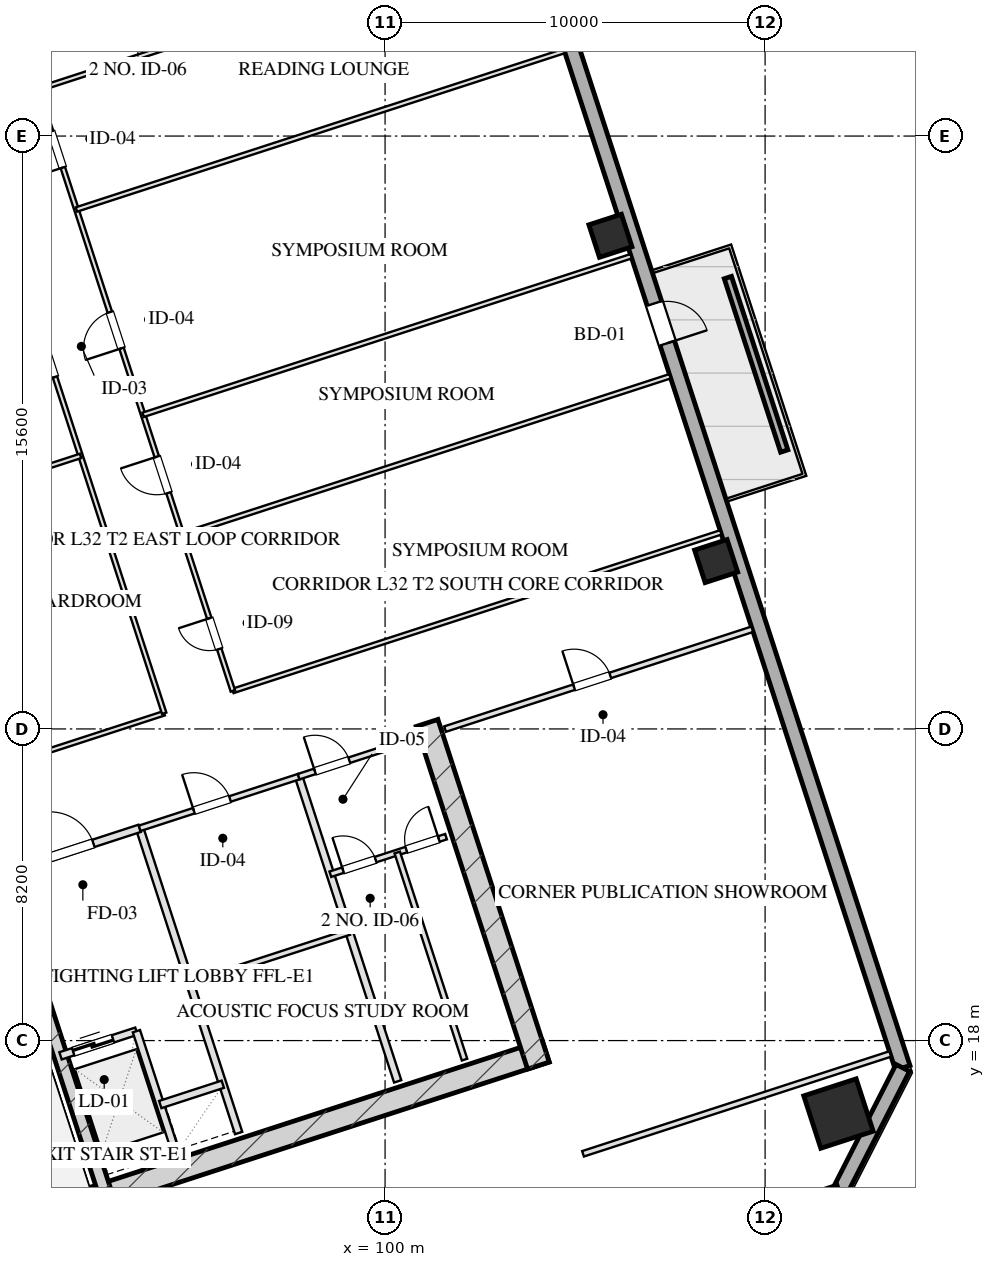
"""IFC4 building model, lengths in metres.
Left out: names, types, materials, properties, quantities, classifications, styles, units other than length and angle.
Written with IfcOpenShell. Run it as: python <this file> out.ifc"""

import sys

from ifc_helpers import new_model, si_unit, direction, frame, frame_2d, origin, origin_2d, place, context, subcontext, project, spatial, rectangle, hollow_rectangle, extrude, element, fill, save


model = new_model("IFC4")
c1 = context("Model", 3, precision=1e-05, world=origin(), true_north=direction((0.0, 1.0)))
c2 = subcontext(c1, "Body", "Model", "MODEL_VIEW")
j1 = project(units=[si_unit("LENGTHUNIT", "METRE"), si_unit("PLANEANGLEUNIT", "RADIAN")], contexts=[c1])
p1 = place(None, origin())
s1 = spatial("IfcSite", under=j1, at=p1, CompositionType="ELEMENT")
p2 = place(p1, origin())
s2 = spatial("IfcBuilding", under=s1, at=p2, CompositionType="ELEMENT")
p3 = place(p2, frame((0.0, 0.0, 124.2)))
s3 = spatial("IfcBuildingStorey", under=s2, at=p3, CompositionType="ELEMENT", Elevation=124.2)
p4 = place(p3, frame((88.63, 12.652, 0.0), z_axis=(0.0, 0.0, 1.0), x_axis=(0.95105714907, 0.309015046886, 0.0)))
e1 = element("IfcWall", 1, at=p4, inside=s3, PredefinedType="SHEAR", context=c2, shape_type="SweptSolid", body=[
    extrude(rectangle(XDim=16.4, YDim=0.6, at=frame_2d((8.2, 0.0))), origin(), (0.0, 0.0, 1.0), 3.45),
])
p5 = place(p3, frame((101.105, 26.358, 0.0), z_axis=(0.0, 0.0, 1.0), x_axis=(0.309010370028, -0.95105866865, 0.0)))
e2 = element("IfcWall", 2, at=p5, inside=s3, PredefinedType="SHEAR", context=c2, shape_type="SweptSolid", body=[
    extrude(rectangle(XDim=9.48, YDim=0.6, at=frame_2d((4.74, 0.0))), origin(), (0.0, 0.0, 1.0), 3.45),
])
p6 = place(p3, frame((90.486, 20.594, 0.0), z_axis=(0.0, 0.0, 1.0), x_axis=(0.309020428229, -0.951055400562, 0.0)))
e3 = element("IfcWall", 3, at=p6, inside=s3, PredefinedType="SHEAR", context=c2, shape_type="SweptSolid", body=[
    extrude(rectangle(XDim=6.98, YDim=0.35, at=frame_2d((3.49, 0.0))), origin(), (0.0, 0.0, 1.0), 3.45),
])
p7 = place(p3, frame((111.931, 16.08, 0.0), z_axis=(0.0, 0.0, 1.0), x_axis=(0.951056516295, 0.309016994375, 0.0)))
e4 = element("IfcColumn", 4, at=p7, inside=s3, PredefinedType="COLUMN", context=c2, shape_type="SweptSolid", body=[
    extrude(hollow_rectangle(XDim=1.45, YDim=1.45, WallThickness=0.05, at=origin_2d()), origin(), (0.0, 0.0, 1.0), 3.451),
])
for number, where, z_axis, x_axis in (
    (5, (108.711, 30.616, 0.0), (0.0, 0.0, 1.0), (0.951, 0.309, 0.0)),
    (6, (105.93, 39.176, 0.0), (0.0, 0.0, 1.0), (0.951, 0.309, 0.0)),
):
    element("IfcColumn", number, at=place(p3, frame(where, z_axis=z_axis, x_axis=x_axis)), inside=s3, PredefinedType="COLUMN", context=c2, shape_type="SweptSolid", body=[
        extrude(hollow_rectangle(XDim=0.9, YDim=0.9, WallThickness=0.032, at=origin_2d()), origin(), (0.0, 0.0, 1.0), 3.451),
    ])
p8 = place(p3, frame((99.284, 61.41, 0.0), z_axis=(0.0, 0.0, 1.0), x_axis=(0.309017542002, -0.95105633836, 0.0)))
e7 = element("IfcWall", 7, at=p8, inside=s3, PredefinedType="SOLIDWALL", context=c2, shape_type="SweptSolid", body=[
    extrude(rectangle(XDim=46.4, YDim=0.4, at=frame_2d((23.2, 0.0))), origin(), (0.0, 0.0, 1.0), 2.61),
])
p9 = place(p8, frame((25.25, 0.0, 0.0)))
e8 = element("IfcOpeningElement", 8, at=p9, cuts=e7, PredefinedType="OPENING", context=c2, shape_type="SweptSolid", body=[
    extrude(rectangle(XDim=1.1, YDim=2.15, at=frame_2d((0.55, 1.075))), frame((0.0, 0.21, 0.0), z_axis=(0.0, -1.0, 0.0), x_axis=(1.0, 0.0, 0.0)), (0.0, 0.0, 1.0), 0.42),
])
p10 = place(p3, frame((113.623, 17.281, 0.0), z_axis=(0.0, 0.0, 1.0), x_axis=(-0.454026238093, -0.890988313685, 0.0)))
e9 = element("IfcWall", 9, at=p10, inside=s3, PredefinedType="SOLIDWALL", context=c2, shape_type="SweptSolid", body=[
    extrude(rectangle(XDim=3.677, YDim=0.4, at=frame_2d((1.838, 0.0))), origin(), (0.0, 0.0, 1.0), 2.61),
])
p11 = place(p3, frame((111.953, 14.005, 0.0), z_axis=(0.0, 0.0, 1.0), x_axis=(-0.95105505922, -0.309021478754, 0.0)))
e10 = element("IfcWall", 10, at=p11, inside=s3, PredefinedType="SOLIDWALL", context=c2, shape_type="SweptSolid", body=[
    extrude(rectangle(XDim=29.4, YDim=0.4, at=frame_2d((14.7, 0.0))), origin(), (0.0, 0.0, 1.0), 2.61),
])
p12 = place(p3, frame((110.504, 33.512, 0.0), z_axis=(0.0, 0.0, 1.0), x_axis=(-0.308986014439, 0.951066581729, 0.0)))
e11 = element("IfcWall", 11, at=p12, inside=s3, PredefinedType="PARAPET", context=c2, shape_type="SweptSolid", body=[
    extrude(rectangle(XDim=4.8, YDim=0.2, at=frame_2d((2.4, 0.0))), origin(), (0.0, 0.0, 1.0), 0.75),
])
p13 = place(p3, frame((93.542, 23.585, 0.0), z_axis=(0.0, 0.0, 1.0), x_axis=(0.309042196757, -0.951048327176, 0.0)))
e12 = element("IfcWall", 12, at=p13, inside=s3, PredefinedType="PARTITIONING", context=c2, shape_type="SweptSolid", body=[
    extrude(rectangle(XDim=8.43, YDim=0.2, at=frame_2d((4.215, 0.0))), origin(), (0.0, 0.0, 1.0), 3.175),
])
p14 = place(p3, frame((89.899, 22.401, 0.0), z_axis=(0.0, 0.0, 1.0), x_axis=(0.951046716504, 0.309047153403, 0.0)))
e13 = element("IfcWall", 13, at=p14, inside=s3, PredefinedType="PARTITIONING", context=c2, shape_type="SweptSolid", body=[
    extrude(rectangle(XDim=3.83, YDim=0.2, at=frame_2d((1.915, 0.0))), origin(), (0.0, 0.0, 1.0), 3.175),
])
p15 = place(p14, frame((1.35, 0.0, 0.0)))
e14 = element("IfcOpeningElement", 14, at=p15, cuts=e13, PredefinedType="OPENING", context=c2, shape_type="SweptSolid", body=[
    extrude(rectangle(XDim=1.2, YDim=2.05, at=frame_2d((0.6, 1.025))), frame((0.0, 0.11, 0.0), z_axis=(0.0, -1.0, 0.0), x_axis=(1.0, 0.0, 0.0)), (0.0, 0.0, 1.0), 0.22),
])
p16 = place(p3, frame((91.46, 17.598, 0.0), z_axis=(0.0, 0.0, 1.0), x_axis=(0.951062257173, 0.308999325213, 0.0)))
e15 = element("IfcWall", 15, at=p16, inside=s3, PredefinedType="PARTITIONING", context=c2, shape_type="SweptSolid", body=[
    extrude(rectangle(XDim=2.1, YDim=0.2, at=frame_2d((1.05, 0.0))), origin(), (0.0, 0.0, 1.0), 3.175),
])
p17 = place(p16, frame((0.35, 0.0, 0.0)))
e16 = element("IfcOpeningElement", 16, at=p17, cuts=e15, PredefinedType="OPENING", context=c2, shape_type="SweptSolid", body=[
    extrude(rectangle(XDim=1.1, YDim=2.05, at=frame_2d((0.55, 1.025))), frame((0.0, 0.11, 0.0), z_axis=(0.0, -1.0, 0.0), x_axis=(1.0, 0.0, 0.0)), (0.0, 0.0, 1.0), 0.22),
])
p18 = place(p3, frame((93.457, 18.247, 0.0), z_axis=(0.0, 0.0, 1.0), x_axis=(0.3089935693, -0.951064127245, 0.0)))
e17 = element("IfcWall", 17, at=p18, inside=s3, PredefinedType="PARTITIONING", context=c2, shape_type="SweptSolid", body=[
    extrude(rectangle(XDim=3.7, YDim=0.2, at=frame_2d((1.85, 0.0))), origin(), (0.0, 0.0, 1.0), 3.175),
])
p19 = place(p3, frame((94.084, 16.317, 0.0), z_axis=(0.0, 0.0, 1.0), x_axis=(0.951041328149, 0.309063734775, 0.0)))
e18 = element("IfcWall", 18, at=p19, inside=s3, PredefinedType="PARTITIONING", context=c2, shape_type="SweptSolid", body=[
    extrude(rectangle(XDim=1.73, YDim=0.2, at=frame_2d((0.865, 0.0))), origin(), (0.0, 0.0, 1.0), 3.175),
])
p20 = place(p3, frame((97.727, 24.944, 0.0), z_axis=(0.0, 0.0, 1.0), x_axis=(0.309016001439, -0.951056838919, 0.0)))
e19 = element("IfcWall", 19, at=p20, inside=s3, PredefinedType="PARTITIONING", context=c2, shape_type="SweptSolid", body=[
    extrude(rectangle(XDim=8.43, YDim=0.2, at=frame_2d((4.215, 0.0))), origin(), (0.0, 0.0, 1.0), 3.175),
])
p21 = place(p3, frame((93.542, 23.585, 0.0), z_axis=(0.0, 0.0, 1.0), x_axis=(0.951063829732, 0.308994485023, 0.0)))
e20 = element("IfcWall", 20, at=p21, inside=s3, PredefinedType="PARTITIONING", context=c2, shape_type="SweptSolid", body=[
    extrude(rectangle(XDim=4.4, YDim=0.15, at=frame_2d((2.2, 0.0))), origin(), (0.0, 0.0, 1.0), 3.175),
])
p22 = place(p21, frame((1.5, 0.0, 0.0)))
e21 = element("IfcOpeningElement", 21, at=p22, cuts=e20, PredefinedType="OPENING", context=c2, shape_type="SweptSolid", body=[
    extrude(rectangle(XDim=1.0, YDim=2.05, at=frame_2d((0.5, 1.025))), frame((0.0, 0.085, 0.0), z_axis=(0.0, -1.0, 0.0), x_axis=(1.0, 0.0, 0.0)), (0.0, 0.0, 1.0), 0.17),
])
p23 = place(p3, frame((94.871, 19.495, 0.0), z_axis=(0.0, 0.0, 1.0), x_axis=(0.951042223598, 0.309060979314, 0.0)))
e22 = element("IfcWall", 22, at=p23, inside=s3, PredefinedType="PARTITIONING", context=c2, shape_type="SweptSolid", body=[
    extrude(rectangle(XDim=4.4, YDim=0.15, at=frame_2d((2.2, 0.0))), origin(), (0.0, 0.0, 1.0), 3.175),
])
p24 = place(p3, frame((97.727, 24.944, 0.0), z_axis=(0.0, 0.0, 1.0), x_axis=(0.951036872128, 0.309077446369, 0.0)))
e23 = element("IfcWall", 23, at=p24, inside=s3, PredefinedType="PARTITIONING", context=c2, shape_type="SweptSolid", body=[
    extrude(rectangle(XDim=3.2, YDim=0.15, at=frame_2d((1.6, 0.0))), origin(), (0.0, 0.0, 1.0), 3.175),
])
p25 = place(p24, frame((0.45, 0.0, 0.0)))
e24 = element("IfcOpeningElement", 24, at=p25, cuts=e23, PredefinedType="OPENING", context=c2, shape_type="SweptSolid", body=[
    extrude(rectangle(XDim=0.95, YDim=2.05, at=frame_2d((0.475, 1.025))), frame((0.0, 0.085, 0.0), z_axis=(0.0, -1.0, 0.0), x_axis=(1.0, 0.0, 0.0)), (0.0, 0.0, 1.0), 0.17),
])
p26 = place(p3, frame((98.561, 22.376, 0.0), z_axis=(0.0, 0.0, 1.0), x_axis=(0.95104415986, 0.309055020985, 0.0)))
e25 = element("IfcWall", 25, at=p26, inside=s3, PredefinedType="PARTITIONING", context=c2, shape_type="SweptSolid", body=[
    extrude(rectangle(XDim=3.2, YDim=0.15, at=frame_2d((1.6, 0.0))), origin(), (0.0, 0.0, 1.0), 3.175),
])
p27 = place(p26, frame((0.35, 0.0, 0.0)))
e26 = element("IfcOpeningElement", 26, at=p27, cuts=e25, PredefinedType="OPENING", context=c2, shape_type="SweptSolid", body=[
    extrude(rectangle(XDim=0.9, YDim=2.05, at=frame_2d((0.45, 1.025))), frame((0.0, 0.085, 0.0), z_axis=(0.0, -1.0, 0.0), x_axis=(1.0, 0.0, 0.0)), (0.0, 0.0, 1.0), 0.17),
])
p28 = place(p26, frame((2.1, 0.0, 0.0)))
e27 = element("IfcOpeningElement", 27, at=p28, cuts=e25, PredefinedType="OPENING", context=c2, shape_type="SweptSolid", body=[
    extrude(rectangle(XDim=0.9, YDim=2.05, at=frame_2d((0.45, 1.025))), frame((0.0, 0.085, 0.0), z_axis=(0.0, -1.0, 0.0), x_axis=(1.0, 0.0, 0.0)), (0.0, 0.0, 1.0), 0.17),
])
p29 = place(p3, frame((100.32, 22.948, 0.0), z_axis=(0.0, 0.0, 1.0), x_axis=(0.309035009867, -0.951050662518, 0.0)))
e28 = element("IfcWall", 28, at=p29, inside=s3, PredefinedType="PARTITIONING", context=c2, shape_type="SweptSolid", body=[
    extrude(rectangle(XDim=5.73, YDim=0.15, at=frame_2d((2.865, 0.0))), origin(), (0.0, 0.0, 1.0), 3.175),
])
p30 = place(p3, frame((105.209, 15.021, 0.0), z_axis=(0.0, 0.0, 1.0), x_axis=(0.951054329824, 0.309023723562, 0.0)))
e29 = element("IfcWall", 29, at=p30, inside=s3, PredefinedType="PARTITIONING", context=c2, shape_type="SweptSolid", body=[
    extrude(rectangle(XDim=8.5, YDim=0.15, at=frame_2d((4.25, 0.0))), origin(), (0.0, 0.0, 1.0), 3.175),
])
p31 = place(p3, frame((101.578, 26.196, 0.0), z_axis=(0.0, 0.0, 1.0), x_axis=(0.951062770994, 0.308997743729, 0.0)))
e30 = element("IfcWall", 30, at=p31, inside=s3, PredefinedType="PARTITIONING", context=c2, shape_type="SweptSolid", body=[
    extrude(rectangle(XDim=8.5, YDim=0.15, at=frame_2d((4.25, 0.0))), origin(), (0.0, 0.0, 1.0), 3.175),
])
p32 = place(p31, frame((3.57, 0.0, 0.0)))
e31 = element("IfcOpeningElement", 31, at=p32, cuts=e30, PredefinedType="OPENING", context=c2, shape_type="SweptSolid", body=[
    extrude(rectangle(XDim=1.0, YDim=2.05, at=frame_2d((0.5, 1.025))), frame((0.0, 0.085, 0.0), z_axis=(0.0, -1.0, 0.0), x_axis=(1.0, 0.0, 0.0)), (0.0, 0.0, 1.0), 0.17),
])
p33 = place(p3, frame((86.675, 24.171, 0.0), z_axis=(0.0, 0.0, 1.0), x_axis=(0.951057231385, 0.309014793547, 0.0)))
e32 = element("IfcWall", 32, at=p33, inside=s3, PredefinedType="PARTITIONING", context=c2, shape_type="SweptSolid", body=[
    extrude(rectangle(XDim=7.9, YDim=0.12, at=frame_2d((3.95, 0.0))), origin(), (0.0, 0.0, 1.0), 3.175),
])
p34 = place(p3, frame((95.995, 27.2, 0.0), z_axis=(0.0, 0.0, 1.0), x_axis=(0.951057589409, 0.309013691651, 0.0)))
e33 = element("IfcWall", 33, at=p34, inside=s3, PredefinedType="PARTITIONING", context=c2, shape_type="SweptSolid", body=[
    extrude(rectangle(XDim=13.5, YDim=0.12, at=frame_2d((6.75, 0.0))), origin(), (0.0, 0.0, 1.0), 3.175),
])
p35 = place(p3, frame((90.853, 43.025, 0.0), z_axis=(0.0, 0.0, 1.0), x_axis=(0.951054001411, 0.309024734286, 0.0)))
e34 = element("IfcWall", 34, at=p35, inside=s3, PredefinedType="PARTITIONING", context=c2, shape_type="SweptSolid", body=[
    extrude(rectangle(XDim=13.5, YDim=0.12, at=frame_2d((6.75, 0.0))), origin(), (0.0, 0.0, 1.0), 3.175),
])
p36 = place(p3, frame((94.188, 26.613, 0.0), z_axis=(0.0, 0.0, 1.0), x_axis=(-0.30901773025, 0.951056277195, 0.0)))
e35 = element("IfcWall", 35, at=p36, inside=s3, PredefinedType="PARTITIONING", context=c2, shape_type="SweptSolid", body=[
    extrude(rectangle(XDim=16.64, YDim=0.12, at=frame_2d((8.32, 0.0))), origin(), (0.0, 0.0, 1.0), 3.175),
])
p37 = place(p36, frame((9.304, 0.0, 0.0)))
e36 = element("IfcOpeningElement", 36, at=p37, cuts=e35, PredefinedType="OPENING", context=c2, shape_type="SweptSolid", body=[
    extrude(rectangle(XDim=1.1, YDim=2.05, at=frame_2d((0.55, 1.025))), frame((0.0, 0.07, 0.0), z_axis=(0.0, -1.0, 0.0), x_axis=(1.0, 0.0, 0.0)), (0.0, 0.0, 1.0), 0.14),
])
p38 = place(p3, frame((95.995, 27.2, 0.0), z_axis=(0.0, 0.0, 1.0), x_axis=(-0.309022042254, 0.951054876125, 0.0)))
e37 = element("IfcWall", 37, at=p38, inside=s3, PredefinedType="PARTITIONING", context=c2, shape_type="SweptSolid", body=[
    extrude(rectangle(XDim=16.64, YDim=0.12, at=frame_2d((8.32, 0.0))), origin(), (0.0, 0.0, 1.0), 3.175),
])
p39 = place(p38, frame((1.16, 0.0, 0.0)))
e38 = element("IfcOpeningElement", 38, at=p39, cuts=e37, PredefinedType="OPENING", context=c2, shape_type="SweptSolid", body=[
    extrude(rectangle(XDim=0.85, YDim=2.05, at=frame_2d((0.425, 1.025))), frame((0.0, 0.07, 0.0), z_axis=(0.0, -1.0, 0.0), x_axis=(1.0, 0.0, 0.0)), (0.0, 0.0, 1.0), 0.14),
])
p40 = place(p38, frame((5.48, 0.0, 0.0)))
e39 = element("IfcOpeningElement", 39, at=p40, cuts=e37, PredefinedType="OPENING", context=c2, shape_type="SweptSolid", body=[
    extrude(rectangle(XDim=1.0, YDim=2.05, at=frame_2d((0.5, 1.025))), frame((0.0, 0.07, 0.0), z_axis=(0.0, -1.0, 0.0), x_axis=(1.0, 0.0, 0.0)), (0.0, 0.0, 1.0), 0.14),
])
p41 = place(p38, frame((9.48, 0.0, 0.0)))
e40 = element("IfcOpeningElement", 40, at=p41, cuts=e37, PredefinedType="OPENING", context=c2, shape_type="SweptSolid", body=[
    extrude(rectangle(XDim=1.0, YDim=2.05, at=frame_2d((0.5, 1.025))), frame((0.0, 0.07, 0.0), z_axis=(0.0, -1.0, 0.0), x_axis=(1.0, 0.0, 0.0)), (0.0, 0.0, 1.0), 0.14),
])
p42 = place(p38, frame((14.48, 0.0, 0.0)))
e41 = element("IfcOpeningElement", 41, at=p42, cuts=e37, PredefinedType="OPENING", context=c2, shape_type="SweptSolid", body=[
    extrude(rectangle(XDim=1.0, YDim=2.05, at=frame_2d((0.5, 1.025))), frame((0.0, 0.07, 0.0), z_axis=(0.0, -1.0, 0.0), x_axis=(1.0, 0.0, 0.0)), (0.0, 0.0, 1.0), 0.14),
])
p43 = place(p3, frame((84.474, 30.943, 0.0), z_axis=(0.0, 0.0, 1.0), x_axis=(0.951057231385, 0.309014793547, 0.0)))
e42 = element("IfcWall", 42, at=p43, inside=s3, PredefinedType="PARTITIONING", context=c2, shape_type="SweptSolid", body=[
    extrude(rectangle(XDim=7.9, YDim=0.12, at=frame_2d((3.95, 0.0))), origin(), (0.0, 0.0, 1.0), 3.175),
])
for number, where, z_axis, x_axis in (
    (43, (94.66, 31.308, 0.0), (0.0, 0.0, 1.0), (0.951, 0.309, 0.0)),
    (44, (93.634, 34.466, 0.0), (0.0, 0.0, 1.0), (0.951, 0.309, 0.0)),
):
    element("IfcWall", number, at=place(p3, frame(where, z_axis=z_axis, x_axis=x_axis)), inside=s3, PredefinedType="PARTITIONING", context=c2, shape_type="SweptSolid", body=[
        extrude(rectangle(XDim=13.5, YDim=0.12, at=frame_2d((6.75, 0.0))), origin(), (0.0, 0.0, 1.0), 3.175),
    ])
p44 = place(p3, frame((91.879, 39.868, 0.0), z_axis=(0.0, 0.0, 1.0), x_axis=(0.951054001411, 0.309024734286, 0.0)))
e45 = element("IfcWall", 45, at=p44, inside=s3, PredefinedType="PARTITIONING", context=c2, shape_type="SweptSolid", body=[
    extrude(rectangle(XDim=13.5, YDim=0.12, at=frame_2d((6.75, 0.0))), origin(), (0.0, 0.0, 1.0), 3.175),
])
p45 = place(p9, origin())
e46 = element("IfcDoor", 46, at=p45, inside=s3, OperationType="SINGLE_SWING_RIGHT", PredefinedType="DOOR", context=c2, shape_type="SweptSolid", body=[
    extrude(rectangle(XDim=1.1, YDim=2.15, at=frame_2d((0.55, 1.075))), frame((0.0, 0.025, 0.0), z_axis=(0.0, -1.0, 0.0), x_axis=(1.0, 0.0, 0.0)), (0.0, 0.0, 1.0), 0.05),
])
fill(e8, e46)
p46 = place(p15, origin())
e47 = element("IfcDoor", 47, at=p46, inside=s3, OperationType="SINGLE_SWING_LEFT", PredefinedType="DOOR", context=c2, shape_type="SweptSolid", body=[
    extrude(rectangle(XDim=1.2, YDim=2.05, at=frame_2d((0.6, 1.025))), frame((0.0, 0.025, 0.0), z_axis=(0.0, -1.0, 0.0), x_axis=(1.0, 0.0, 0.0)), (0.0, 0.0, 1.0), 0.05),
])
fill(e14, e47)
p47 = place(p17, origin())
e48 = element("IfcDoor", 48, at=p47, inside=s3, OperationType="DOUBLE_DOOR_SLIDING", PredefinedType="DOOR", context=c2, shape_type="SweptSolid", body=[
    extrude(rectangle(XDim=1.1, YDim=2.05, at=frame_2d((0.55, 1.025))), frame((0.0, 0.025, 0.0), z_axis=(0.0, -1.0, 0.0), x_axis=(1.0, 0.0, 0.0)), (0.0, 0.0, 1.0), 0.05),
])
fill(e16, e48)
p48 = place(p22, origin())
e49 = element("IfcDoor", 49, at=p48, inside=s3, OperationType="SINGLE_SWING_LEFT", PredefinedType="DOOR", context=c2, shape_type="SweptSolid", body=[
    extrude(rectangle(XDim=1.0, YDim=2.05, at=frame_2d((0.5, 1.025))), frame((0.0, 0.025, 0.0), z_axis=(0.0, -1.0, 0.0), x_axis=(1.0, 0.0, 0.0)), (0.0, 0.0, 1.0), 0.05),
])
fill(e21, e49)
p49 = place(p25, origin())
e50 = element("IfcDoor", 50, at=p49, inside=s3, OperationType="SINGLE_SWING_LEFT", PredefinedType="DOOR", context=c2, shape_type="SweptSolid", body=[
    extrude(rectangle(XDim=0.95, YDim=2.05, at=frame_2d((0.475, 1.025))), frame((0.0, 0.025, 0.0), z_axis=(0.0, -1.0, 0.0), x_axis=(1.0, 0.0, 0.0)), (0.0, 0.0, 1.0), 0.05),
])
fill(e24, e50)
p50 = place(p27, origin())
e51 = element("IfcDoor", 51, at=p50, inside=s3, OperationType="SINGLE_SWING_LEFT", PredefinedType="DOOR", context=c2, shape_type="SweptSolid", body=[
    extrude(rectangle(XDim=0.9, YDim=2.05, at=frame_2d((0.45, 1.025))), frame((0.0, 0.025, 0.0), z_axis=(0.0, -1.0, 0.0), x_axis=(1.0, 0.0, 0.0)), (0.0, 0.0, 1.0), 0.05),
])
fill(e26, e51)
p51 = place(p28, origin())
e52 = element("IfcDoor", 52, at=p51, inside=s3, OperationType="SINGLE_SWING_RIGHT", PredefinedType="DOOR", context=c2, shape_type="SweptSolid", body=[
    extrude(rectangle(XDim=0.9, YDim=2.05, at=frame_2d((0.45, 1.025))), frame((0.0, 0.025, 0.0), z_axis=(0.0, -1.0, 0.0), x_axis=(1.0, 0.0, 0.0)), (0.0, 0.0, 1.0), 0.05),
])
fill(e27, e52)
p52 = place(p32, origin())
e53 = element("IfcDoor", 53, at=p52, inside=s3, OperationType="SINGLE_SWING_LEFT", PredefinedType="DOOR", context=c2, shape_type="SweptSolid", body=[
    extrude(rectangle(XDim=1.0, YDim=2.05, at=frame_2d((0.5, 1.025))), frame((0.0, 0.025, 0.0), z_axis=(0.0, -1.0, 0.0), x_axis=(1.0, 0.0, 0.0)), (0.0, 0.0, 1.0), 0.05),
])
fill(e31, e53)
p53 = place(p37, origin())
e54 = element("IfcDoor", 54, at=p53, inside=s3, OperationType="SINGLE_SWING_LEFT", PredefinedType="DOOR", context=c2, shape_type="SweptSolid", body=[
    extrude(rectangle(XDim=1.1, YDim=2.05, at=frame_2d((0.55, 1.025))), frame((0.0, 0.025, 0.0), z_axis=(0.0, -1.0, 0.0), x_axis=(1.0, 0.0, 0.0)), (0.0, 0.0, 1.0), 0.05),
])
fill(e36, e54)
p54 = place(p39, origin())
e55 = element("IfcDoor", 55, at=p54, inside=s3, OperationType="SINGLE_SWING_RIGHT", PredefinedType="DOOR", context=c2, shape_type="SweptSolid", body=[
    extrude(rectangle(XDim=0.85, YDim=2.05, at=frame_2d((0.425, 1.025))), frame((0.0, 0.025, 0.0), z_axis=(0.0, -1.0, 0.0), x_axis=(1.0, 0.0, 0.0)), (0.0, 0.0, 1.0), 0.05),
])
fill(e38, e55)
p55 = place(p40, origin())
e56 = element("IfcDoor", 56, at=p55, inside=s3, OperationType="SINGLE_SWING_RIGHT", PredefinedType="DOOR", context=c2, shape_type="SweptSolid", body=[
    extrude(rectangle(XDim=1.0, YDim=2.05, at=frame_2d((0.5, 1.025))), frame((0.0, 0.025, 0.0), z_axis=(0.0, -1.0, 0.0), x_axis=(1.0, 0.0, 0.0)), (0.0, 0.0, 1.0), 0.05),
])
fill(e39, e56)
p56 = place(p41, origin())
e57 = element("IfcDoor", 57, at=p56, inside=s3, OperationType="SINGLE_SWING_LEFT", PredefinedType="DOOR", context=c2, shape_type="SweptSolid", body=[
    extrude(rectangle(XDim=1.0, YDim=2.05, at=frame_2d((0.5, 1.025))), frame((0.0, 0.025, 0.0), z_axis=(0.0, -1.0, 0.0), x_axis=(1.0, 0.0, 0.0)), (0.0, 0.0, 1.0), 0.05),
])
fill(e40, e57)
p57 = place(p42, origin())
e58 = element("IfcDoor", 58, at=p57, inside=s3, OperationType="SINGLE_SWING_LEFT", PredefinedType="DOOR", context=c2, shape_type="SweptSolid", body=[
    extrude(rectangle(XDim=1.0, YDim=2.05, at=frame_2d((0.5, 1.025))), frame((0.0, 0.025, 0.0), z_axis=(0.0, -1.0, 0.0), x_axis=(1.0, 0.0, 0.0)), (0.0, 0.0, 1.0), 0.05),
])
fill(e41, e58)
save(model, sys.argv[1])
